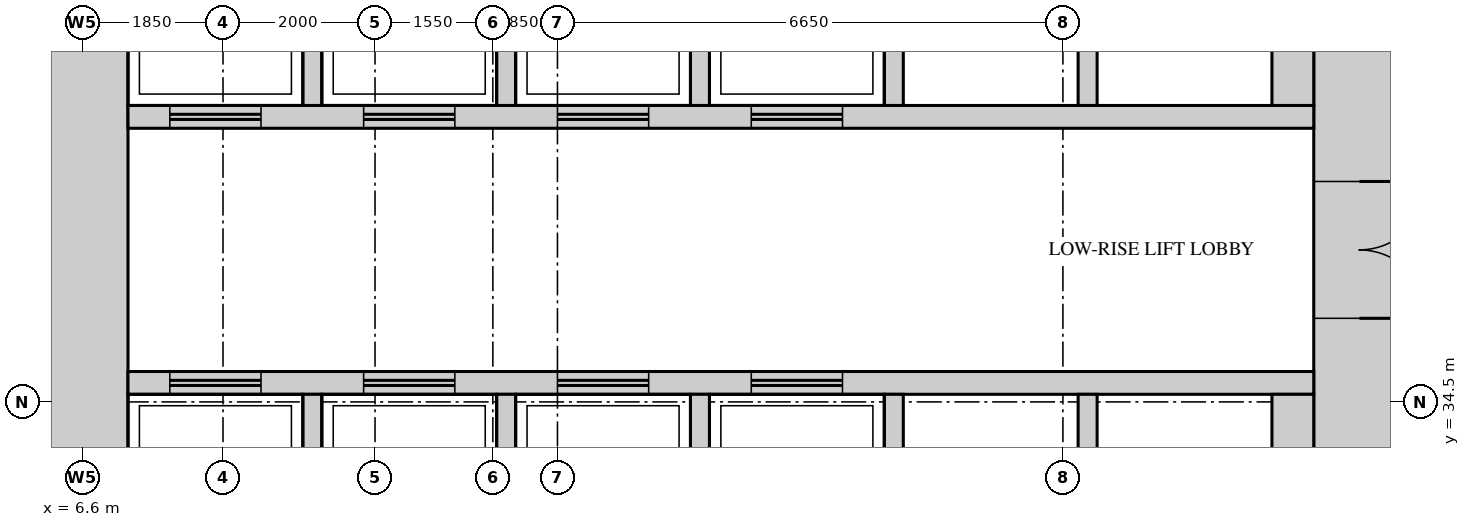
"""IFC4 building model, lengths in metres.
Left out: names, types, materials, properties, quantities, classifications, styles, units other than length and angle.
Written with IfcOpenShell. Run it as: python <this file> out.ifc"""

import sys

from ifc_helpers import new_model, si_unit, direction, frame, frame_2d, origin, place, context, subcontext, project, spatial, rectangle, extrude, source, transform, mapped, element, fill, save


model = new_model("IFC4")
c1 = context("Model", 3, precision=1e-05, world=origin(), true_north=direction((0.0, 1.0)))
c2 = subcontext(c1, "Body", "Model", "MODEL_VIEW")
j1 = project(units=[si_unit("LENGTHUNIT", "METRE"), si_unit("PLANEANGLEUNIT", "RADIAN")], contexts=[c1])
p1 = place(None, origin())
s1 = spatial("IfcSite", under=j1, at=p1, CompositionType="ELEMENT")
p2 = place(p1, origin())
s2 = spatial("IfcBuilding", under=s1, at=p2, CompositionType="ELEMENT")
p3 = place(p2, frame((0.0, 0.0, 78.0)))
s3 = spatial("IfcBuildingStorey", under=s2, at=p3, CompositionType="ELEMENT", Elevation=78.0)
m1 = source(origin(), c2, "Body", "SweptSolid", [
    extrude(rectangle(XDim=27.6, YDim=1.2, at=frame_2d((13.8, 0.0))), origin(), (0.0, 0.0, 1.0), 4.2),
])
p4 = place(p3, frame((23.4, 13.2, 0.0), z_axis=(0.0, 0.0, 1.0), x_axis=(0.0, 1.0, 0.0)))
e1 = element("IfcWall", 1, at=p4, inside=s3, PredefinedType="SHEAR", context=c2, shape_type="MappedRepresentation", body=[
    mapped(m1, transform((0.0, 0.0, 0.0))),
])
m2 = source(origin(), c2, "Body", "SweptSolid", [
    extrude(rectangle(XDim=1.8, YDim=2.1, at=frame_2d((0.9, 1.05))), frame((0.0, 0.61, 0.0), z_axis=(0.0, -1.0, 0.0), x_axis=(1.0, 0.0, 0.0)), (0.0, 0.0, 1.0), 1.22),
])
p5 = place(p4, frame((22.4, 0.0, 0.0)))
e2 = element("IfcOpeningElement", 2, at=p5, cuts=e1, PredefinedType="OPENING", context=c2, shape_type="MappedRepresentation", body=[
    mapped(m2, transform((0.0, 0.0, 0.0))),
])
m3 = source(origin(), c2, "Body", "SweptSolid", [
    extrude(rectangle(XDim=1.2, YDim=2.1, at=frame_2d((0.6, 1.05))), frame((0.0, 0.61, 0.0), z_axis=(0.0, -1.0, 0.0), x_axis=(1.0, 0.0, 0.0)), (0.0, 0.0, 1.0), 1.22),
])
p6 = place(p4, frame((14.4, 0.0, 0.0)))
e3 = element("IfcOpeningElement", 3, at=p6, cuts=e1, PredefinedType="OPENING", context=c2, shape_type="MappedRepresentation", body=[
    mapped(m3, transform((0.0, 0.0, 0.0))),
])
m4 = source(origin(), c2, "Body", "SweptSolid", [
    extrude(rectangle(XDim=0.9, YDim=2.1, at=frame_2d((0.45, 1.05))), frame((0.0, 0.61, 0.0), z_axis=(0.0, -1.0, 0.0), x_axis=(1.0, 0.0, 0.0)), (0.0, 0.0, 1.0), 1.22),
])
p7 = place(p4, frame((1.15, 0.0, 0.0)))
e4 = element("IfcOpeningElement", 4, at=p7, cuts=e1, PredefinedType="OPENING", context=c2, shape_type="MappedRepresentation", body=[
    mapped(m4, transform((0.0, 0.0, 0.0))),
])
p8 = place(p4, frame((6.0, 0.0, 0.0)))
e5 = element("IfcOpeningElement", 5, at=p8, cuts=e1, PredefinedType="OPENING", context=c2, shape_type="MappedRepresentation", body=[
    mapped(m4, transform((0.0, 0.0, 0.0))),
])
p9 = place(p3, frame((6.6, 13.2, 0.0), z_axis=(0.0, 0.0, 1.0), x_axis=(0.0, 1.0, 0.0)))
e6 = element("IfcWall", 6, at=p9, inside=s3, PredefinedType="SHEAR", context=c2, shape_type="MappedRepresentation", body=[
    mapped(m1, transform((0.0, 0.0, 0.0))),
])
m5 = source(origin(), c2, "Body", "SweptSolid", [
    extrude(rectangle(XDim=15.6, YDim=0.3, at=frame_2d((7.8, 0.0))), origin(), (0.0, 0.0, 1.0), 4.2),
])
p10 = place(p3, frame((7.2, 38.25, 0.0), z_axis=(0.0, 0.0, 1.0), x_axis=(1.0, 0.0, 0.0)))
e7 = element("IfcWall", 7, at=p10, inside=s3, PredefinedType="STANDARD", context=c2, shape_type="MappedRepresentation", body=[
    mapped(m5, transform((0.0, 0.0, 0.0))),
])
m6 = source(origin(), c2, "Body", "SweptSolid", [
    extrude(rectangle(XDim=1.2, YDim=2.1, at=frame_2d((0.6, 1.05))), frame((0.0, 0.16, 0.0), z_axis=(0.0, -1.0, 0.0), x_axis=(1.0, 0.0, 0.0)), (0.0, 0.0, 1.0), 0.32),
])
p11 = place(p10, frame((0.55, 0.0, 0.0)))
e8 = element("IfcOpeningElement", 8, at=p11, cuts=e7, PredefinedType="OPENING", context=c2, shape_type="MappedRepresentation", body=[
    mapped(m6, transform((0.0, 0.0, 0.0))),
])
p12 = place(p10, frame((3.1, 0.0, 0.0)))
e9 = element("IfcOpeningElement", 9, at=p12, cuts=e7, PredefinedType="OPENING", context=c2, shape_type="MappedRepresentation", body=[
    mapped(m6, transform((0.0, 0.0, 0.0))),
])
p13 = place(p10, frame((5.65, 0.0, 0.0)))
e10 = element("IfcOpeningElement", 10, at=p13, cuts=e7, PredefinedType="OPENING", context=c2, shape_type="MappedRepresentation", body=[
    mapped(m6, transform((0.0, 0.0, 0.0))),
])
p14 = place(p10, frame((8.2, 0.0, 0.0)))
e11 = element("IfcOpeningElement", 11, at=p14, cuts=e7, PredefinedType="OPENING", context=c2, shape_type="MappedRepresentation", body=[
    mapped(m6, transform((0.0, 0.0, 0.0))),
])
p15 = place(p3, frame((7.2, 34.75, 0.0), z_axis=(0.0, 0.0, 1.0), x_axis=(1.0, 0.0, 0.0)))
e12 = element("IfcWall", 12, at=p15, inside=s3, PredefinedType="STANDARD", context=c2, shape_type="MappedRepresentation", body=[
    mapped(m5, transform((0.0, 0.0, 0.0))),
])
p16 = place(p15, frame((0.55, 0.0, 0.0)))
e13 = element("IfcOpeningElement", 13, at=p16, cuts=e12, PredefinedType="OPENING", context=c2, shape_type="MappedRepresentation", body=[
    mapped(m6, transform((0.0, 0.0, 0.0))),
])
p17 = place(p15, frame((3.1, 0.0, 0.0)))
e14 = element("IfcOpeningElement", 14, at=p17, cuts=e12, PredefinedType="OPENING", context=c2, shape_type="MappedRepresentation", body=[
    mapped(m6, transform((0.0, 0.0, 0.0))),
])
p18 = place(p15, frame((5.65, 0.0, 0.0)))
e15 = element("IfcOpeningElement", 15, at=p18, cuts=e12, PredefinedType="OPENING", context=c2, shape_type="MappedRepresentation", body=[
    mapped(m6, transform((0.0, 0.0, 0.0))),
])
p19 = place(p15, frame((8.2, 0.0, 0.0)))
e16 = element("IfcOpeningElement", 16, at=p19, cuts=e12, PredefinedType="OPENING", context=c2, shape_type="MappedRepresentation", body=[
    mapped(m6, transform((0.0, 0.0, 0.0))),
])
m7 = source(origin(), c2, "Body", "SweptSolid", [
    extrude(rectangle(XDim=2.4, YDim=0.25, at=frame_2d((1.2, 0.0))), origin(), (0.0, 0.0, 1.0), 4.2),
])
for number, where, z_axis, x_axis in (
    (17, (9.625, 38.4, 0.0), (0.0, 0.0, 1.0), (0.0, 1.0, 0.0)),
    (18, (12.175, 38.4, 0.0), (0.0, 0.0, 1.0), (0.0, 1.0, 0.0)),
    (19, (14.725, 38.4, 0.0), (0.0, 0.0, 1.0), (0.0, 1.0, 0.0)),
    (20, (17.275, 38.4, 0.0), (0.0, 0.0, 1.0), (0.0, 1.0, 0.0)),
    (21, (19.825, 38.4, 0.0), (0.0, 0.0, 1.0), (0.0, 1.0, 0.0)),
):
    element("IfcWall", number, at=place(p3, frame(where, z_axis=z_axis, x_axis=x_axis)), inside=s3, PredefinedType="STANDARD", context=c2, shape_type="MappedRepresentation", body=[
        mapped(m7, transform((0.0, 0.0, 0.0))),
    ])
m8 = source(origin(), c2, "Body", "SweptSolid", [
    extrude(rectangle(XDim=2.4, YDim=0.55, at=frame_2d((1.2, 0.0))), origin(), (0.0, 0.0, 1.0), 4.2),
])
p20 = place(p3, frame((22.525, 38.4, 0.0), z_axis=(0.0, 0.0, 1.0), x_axis=(0.0, 1.0, 0.0)))
e22 = element("IfcWall", 22, at=p20, inside=s3, PredefinedType="STANDARD", context=c2, shape_type="MappedRepresentation", body=[
    mapped(m8, transform((0.0, 0.0, 0.0))),
])
for number, where, z_axis, x_axis in (
    (23, (9.625, 32.2, 0.0), (0.0, 0.0, 1.0), (0.0, 1.0, 0.0)),
    (24, (12.175, 32.2, 0.0), (0.0, 0.0, 1.0), (0.0, 1.0, 0.0)),
    (25, (14.725, 32.2, 0.0), (0.0, 0.0, 1.0), (0.0, 1.0, 0.0)),
    (26, (17.275, 32.2, 0.0), (0.0, 0.0, 1.0), (0.0, 1.0, 0.0)),
    (27, (19.825, 32.2, 0.0), (0.0, 0.0, 1.0), (0.0, 1.0, 0.0)),
):
    element("IfcWall", number, at=place(p3, frame(where, z_axis=z_axis, x_axis=x_axis)), inside=s3, PredefinedType="STANDARD", context=c2, shape_type="MappedRepresentation", body=[
        mapped(m7, transform((0.0, 0.0, 0.0))),
    ])
p21 = place(p3, frame((22.525, 32.2, 0.0), z_axis=(0.0, 0.0, 1.0), x_axis=(0.0, 1.0, 0.0)))
e28 = element("IfcWall", 28, at=p21, inside=s3, PredefinedType="STANDARD", context=c2, shape_type="MappedRepresentation", body=[
    mapped(m8, transform((0.0, 0.0, 0.0))),
])
m9 = source(origin(), c2, "Body", "SweptSolid", [
    extrude(rectangle(XDim=1.8, YDim=2.1, at=frame_2d((0.9, 1.05))), frame((0.0, 0.55, 0.0), z_axis=(0.0, -1.0, 0.0), x_axis=(1.0, 0.0, 0.0)), (0.0, 0.0, 1.0), 1.1),
])
p22 = place(p5, origin())
e29 = element("IfcDoor", 29, at=p22, inside=s3, OperationType="DOUBLE_DOOR_SINGLE_SWING", PredefinedType="DOOR", context=c2, shape_type="MappedRepresentation", body=[
    mapped(m9, transform((0.0, 0.0, 0.0))),
])
fill(e2, e29)
m10 = source(origin(), c2, "Body", "SweptSolid", [
    extrude(rectangle(XDim=1.2, YDim=2.1, at=frame_2d((0.6, 1.05))), frame((0.0, 0.025, 0.0), z_axis=(0.0, -1.0, 0.0), x_axis=(1.0, 0.0, 0.0)), (0.0, 0.0, 1.0), 0.05),
])
p23 = place(p16, origin())
e30 = element("IfcDoor", 30, at=p23, inside=s3, OperationType="DOUBLE_DOOR_SLIDING", PredefinedType="DOOR", context=c2, shape_type="MappedRepresentation", body=[
    mapped(m10, transform((0.0, 0.0, 0.0))),
])
fill(e13, e30)
p24 = place(p17, origin())
e31 = element("IfcDoor", 31, at=p24, inside=s3, OperationType="DOUBLE_DOOR_SLIDING", PredefinedType="DOOR", context=c2, shape_type="MappedRepresentation", body=[
    mapped(m10, transform((0.0, 0.0, 0.0))),
])
fill(e14, e31)
p25 = place(p18, origin())
e32 = element("IfcDoor", 32, at=p25, inside=s3, OperationType="DOUBLE_DOOR_SLIDING", PredefinedType="DOOR", context=c2, shape_type="MappedRepresentation", body=[
    mapped(m10, transform((0.0, 0.0, 0.0))),
])
fill(e15, e32)
p26 = place(p19, origin())
e33 = element("IfcDoor", 33, at=p26, inside=s3, OperationType="DOUBLE_DOOR_SLIDING", PredefinedType="DOOR", context=c2, shape_type="MappedRepresentation", body=[
    mapped(m10, transform((0.0, 0.0, 0.0))),
])
fill(e16, e33)
p27 = place(p11, origin())
e34 = element("IfcDoor", 34, at=p27, inside=s3, OperationType="DOUBLE_DOOR_SLIDING", PredefinedType="DOOR", context=c2, shape_type="MappedRepresentation", body=[
    mapped(m10, transform((0.0, 0.0, 0.0))),
])
fill(e8, e34)
p28 = place(p12, origin())
e35 = element("IfcDoor", 35, at=p28, inside=s3, OperationType="DOUBLE_DOOR_SLIDING", PredefinedType="DOOR", context=c2, shape_type="MappedRepresentation", body=[
    mapped(m10, transform((0.0, 0.0, 0.0))),
])
fill(e9, e35)
p29 = place(p13, origin())
e36 = element("IfcDoor", 36, at=p29, inside=s3, OperationType="DOUBLE_DOOR_SLIDING", PredefinedType="DOOR", context=c2, shape_type="MappedRepresentation", body=[
    mapped(m10, transform((0.0, 0.0, 0.0))),
])
fill(e10, e36)
p30 = place(p14, origin())
e37 = element("IfcDoor", 37, at=p30, inside=s3, OperationType="DOUBLE_DOOR_SLIDING", PredefinedType="DOOR", context=c2, shape_type="MappedRepresentation", body=[
    mapped(m10, transform((0.0, 0.0, 0.0))),
])
fill(e11, e37)
save(model, sys.argv[1])
